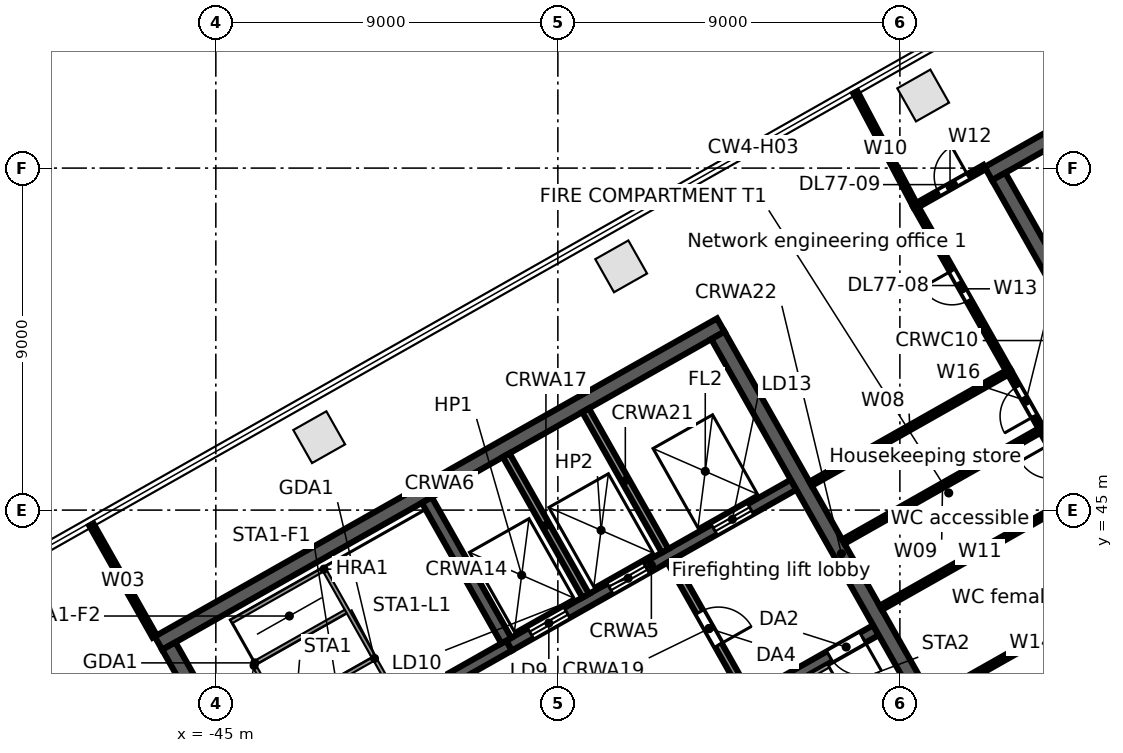
"""IFC4 building model, lengths in metres.
Left out: names, types, materials, properties, quantities, classifications, styles, units other than length and angle.
Written with IfcOpenShell. Run it as: python <this file> out.ifc"""

import sys

from ifc_helpers import new_model, si_unit, direction, frame, frame_2d, origin, origin_2d, place, context, subcontext, project, spatial, rectangle, extrude, element, fill, save


model = new_model("IFC4")
c1 = context("Model", 3, precision=1e-05, world=origin(), true_north=direction((0.0, 1.0)))
c2 = subcontext(c1, "Body", "Model", "MODEL_VIEW")
j1 = project(units=[si_unit("LENGTHUNIT", "METRE"), si_unit("PLANEANGLEUNIT", "RADIAN")], contexts=[c1])
p1 = place(None, origin())
s1 = spatial("IfcSite", under=j1, at=p1, CompositionType="ELEMENT")
p2 = place(p1, origin())
s2 = spatial("IfcBuilding", under=s1, at=p2, CompositionType="ELEMENT")
p3 = place(p2, frame((0.0, 0.0, 343.1)))
s3 = spatial("IfcBuildingStorey", under=s2, at=p3, CompositionType="ELEMENT", Elevation=343.1)
for number, where, z_axis, x_axis in (
    (1, (-26.388, 55.91, 0.0), (0.0, 0.0, 1.0), (-0.87, -0.492, 0.0)),
    (2, (-34.334, 51.414, 0.0), (0.0, 0.0, 1.0), (-0.87, -0.492, 0.0)),
):
    element("IfcColumn", number, at=place(p3, frame(where, z_axis=z_axis, x_axis=x_axis)), inside=s3, PredefinedType="COLUMN", context=c2, shape_type="SweptSolid", body=[
        extrude(rectangle(XDim=1.0, YDim=1.0, at=origin_2d()), origin(), (0.0, 0.0, 1.0), 3.5),
    ])
p4 = place(p3, frame((-42.28, 46.919, 0.0), z_axis=(0.0, 0.0, 1.0), x_axis=(-0.87035569594, -0.492423560103, 0.0)))
e3 = element("IfcColumn", 3, at=p4, inside=s3, PredefinedType="COLUMN", context=c2, shape_type="SweptSolid", body=[
    extrude(rectangle(XDim=1.0, YDim=1.0, at=origin_2d()), origin(), (0.0, 0.0, 1.0), 3.8),
])
p5 = place(p3, frame((-3.017, 46.293, 0.0), z_axis=(0.0, 0.0, 1.0), x_axis=(-0.870355474887, -0.492423950812, 0.0)))
e4 = element("IfcWall", 4, at=p5, inside=s3, PredefinedType="STANDARD", context=c2, shape_type="SweptSolid", body=[
    extrude(rectangle(XDim=40.34, YDim=0.25, at=frame_2d((20.17, 0.0))), origin(), (0.0, 0.0, 1.0), 3.5),
])
p6 = place(p5, frame((37.428, 0.0, 0.8)))
e5 = element("IfcOpeningElement", 5, at=p6, cuts=e4, PredefinedType="OPENING", context=c2, shape_type="SweptSolid", body=[
    extrude(rectangle(XDim=2.4, YDim=2.2, at=frame_2d((1.2, 1.1))), frame((0.0, 0.135, 0.0), z_axis=(0.0, -1.0, 0.0), x_axis=(1.0, 0.0, 0.0)), (0.0, 0.0, 1.0), 0.27),
])
p7 = place(p5, frame((34.372, 0.0, 0.0)))
e6 = element("IfcOpeningElement", 6, at=p7, cuts=e4, PredefinedType="OPENING", context=c2, shape_type="SweptSolid", body=[
    extrude(rectangle(XDim=1.8, YDim=2.4, at=frame_2d((0.9, 1.2))), frame((0.0, 0.135, 0.0), z_axis=(0.0, -1.0, 0.0), x_axis=(1.0, 0.0, 0.0)), (0.0, 0.0, 1.0), 0.27),
])
p8 = place(p5, frame((30.716, 0.0, 0.8)))
e7 = element("IfcOpeningElement", 7, at=p8, cuts=e4, PredefinedType="OPENING", context=c2, shape_type="SweptSolid", body=[
    extrude(rectangle(XDim=2.4, YDim=2.2, at=frame_2d((1.2, 1.1))), frame((0.0, 0.135, 0.0), z_axis=(0.0, -1.0, 0.0), x_axis=(1.0, 0.0, 0.0)), (0.0, 0.0, 1.0), 0.27),
])
p9 = place(p5, frame((27.36, 0.0, 0.8)))
e8 = element("IfcOpeningElement", 8, at=p9, cuts=e4, PredefinedType="OPENING", context=c2, shape_type="SweptSolid", body=[
    extrude(rectangle(XDim=2.4, YDim=2.2, at=frame_2d((1.2, 1.1))), frame((0.0, 0.135, 0.0), z_axis=(0.0, -1.0, 0.0), x_axis=(1.0, 0.0, 0.0)), (0.0, 0.0, 1.0), 0.27),
])
p10 = place(p5, frame((24.304, 0.0, 0.0)))
e9 = element("IfcOpeningElement", 9, at=p10, cuts=e4, PredefinedType="OPENING", context=c2, shape_type="SweptSolid", body=[
    extrude(rectangle(XDim=1.8, YDim=2.4, at=frame_2d((0.9, 1.2))), frame((0.0, 0.135, 0.0), z_axis=(0.0, -1.0, 0.0), x_axis=(1.0, 0.0, 0.0)), (0.0, 0.0, 1.0), 0.27),
])
p11 = place(p5, frame((20.648, 0.0, 0.8)))
e10 = element("IfcOpeningElement", 10, at=p11, cuts=e4, PredefinedType="OPENING", context=c2, shape_type="SweptSolid", body=[
    extrude(rectangle(XDim=2.4, YDim=2.2, at=frame_2d((1.2, 1.1))), frame((0.0, 0.135, 0.0), z_axis=(0.0, -1.0, 0.0), x_axis=(1.0, 0.0, 0.0)), (0.0, 0.0, 1.0), 0.27),
])
p12 = place(p5, frame((17.292, 0.0, 0.8)))
e11 = element("IfcOpeningElement", 11, at=p12, cuts=e4, PredefinedType="OPENING", context=c2, shape_type="SweptSolid", body=[
    extrude(rectangle(XDim=2.4, YDim=2.2, at=frame_2d((1.2, 1.1))), frame((0.0, 0.135, 0.0), z_axis=(0.0, -1.0, 0.0), x_axis=(1.0, 0.0, 0.0)), (0.0, 0.0, 1.0), 0.27),
])
p13 = place(p5, frame((14.236, 0.0, 0.0)))
e12 = element("IfcOpeningElement", 12, at=p13, cuts=e4, PredefinedType="OPENING", context=c2, shape_type="SweptSolid", body=[
    extrude(rectangle(XDim=1.8, YDim=2.4, at=frame_2d((0.9, 1.2))), frame((0.0, 0.135, 0.0), z_axis=(0.0, -1.0, 0.0), x_axis=(1.0, 0.0, 0.0)), (0.0, 0.0, 1.0), 0.27),
])
p14 = place(p5, frame((10.58, 0.0, 0.8)))
e13 = element("IfcOpeningElement", 13, at=p14, cuts=e4, PredefinedType="OPENING", context=c2, shape_type="SweptSolid", body=[
    extrude(rectangle(XDim=2.4, YDim=2.2, at=frame_2d((1.2, 1.1))), frame((0.0, 0.135, 0.0), z_axis=(0.0, -1.0, 0.0), x_axis=(1.0, 0.0, 0.0)), (0.0, 0.0, 1.0), 0.27),
])
p15 = place(p5, frame((7.224, 0.0, 0.8)))
e14 = element("IfcOpeningElement", 14, at=p15, cuts=e4, PredefinedType="OPENING", context=c2, shape_type="SweptSolid", body=[
    extrude(rectangle(XDim=2.4, YDim=2.2, at=frame_2d((1.2, 1.1))), frame((0.0, 0.135, 0.0), z_axis=(0.0, -1.0, 0.0), x_axis=(1.0, 0.0, 0.0)), (0.0, 0.0, 1.0), 0.27),
])
p16 = place(p5, frame((4.168, 0.0, 0.0)))
e15 = element("IfcOpeningElement", 15, at=p16, cuts=e4, PredefinedType="OPENING", context=c2, shape_type="SweptSolid", body=[
    extrude(rectangle(XDim=1.8, YDim=2.4, at=frame_2d((0.9, 1.2))), frame((0.0, 0.135, 0.0), z_axis=(0.0, -1.0, 0.0), x_axis=(1.0, 0.0, 0.0)), (0.0, 0.0, 1.0), 0.27),
])
p17 = place(p5, frame((0.512, 0.0, 0.8)))
e16 = element("IfcOpeningElement", 16, at=p17, cuts=e4, PredefinedType="OPENING", context=c2, shape_type="SweptSolid", body=[
    extrude(rectangle(XDim=2.4, YDim=2.2, at=frame_2d((1.2, 1.1))), frame((0.0, 0.135, 0.0), z_axis=(0.0, -1.0, 0.0), x_axis=(1.0, 0.0, 0.0)), (0.0, 0.0, 1.0), 0.27),
])
p18 = place(p3, frame((-34.245, 38.097, 0.0), z_axis=(0.0, 0.0, 1.0), x_axis=(0.870356351998, 0.492422400523, 0.0)))
e17 = element("IfcWall", 17, at=p18, inside=s3, PredefinedType="SOLIDWALL", context=c2, shape_type="SweptSolid", body=[
    extrude(rectangle(XDim=7.6, YDim=0.3, at=frame_2d((3.8, 0.0))), origin(), (0.0, 0.0, 1.0), 3.5),
])
p19 = place(p18, frame((6.2, 0.0, 0.0)))
e18 = element("IfcOpeningElement", 18, at=p19, cuts=e17, PredefinedType="OPENING", context=c2, shape_type="SweptSolid", body=[
    extrude(rectangle(XDim=1.0, YDim=2.1, at=frame_2d((0.5, 1.05))), frame((0.0, 0.16, 0.0), z_axis=(0.0, -1.0, 0.0), x_axis=(1.0, 0.0, 0.0)), (0.0, 0.0, 1.0), 0.32),
])
p20 = place(p3, frame((-43.897, 37.692, 0.0), z_axis=(0.0, 0.0, 1.0), x_axis=(0.870356351998, 0.492422400523, 0.0)))
e19 = element("IfcWall", 19, at=p20, inside=s3, PredefinedType="SOLIDWALL", context=c2, shape_type="SweptSolid", body=[
    extrude(rectangle(XDim=7.6, YDim=0.3, at=frame_2d((3.8, 0.0))), origin(), (0.0, 0.0, 1.0), 3.5),
])
p21 = place(p20, frame((0.4, 0.0, 0.0)))
e20 = element("IfcOpeningElement", 20, at=p21, cuts=e19, PredefinedType="OPENING", context=c2, shape_type="SweptSolid", body=[
    extrude(rectangle(XDim=1.0, YDim=2.1, at=frame_2d((0.5, 1.05))), frame((0.0, 0.16, 0.0), z_axis=(0.0, -1.0, 0.0), x_axis=(1.0, 0.0, 0.0)), (0.0, 0.0, 1.0), 0.32),
])
p22 = place(p3, frame((-37.282, 41.435, 0.0), z_axis=(0.0, 0.0, 1.0), x_axis=(0.870361315115, 0.492413628113, 0.0)))
e21 = element("IfcWall", 21, at=p22, inside=s3, PredefinedType="SOLIDWALL", context=c2, shape_type="SweptSolid", body=[
    extrude(rectangle(XDim=8.6, YDim=0.3, at=frame_2d((4.3, 0.0))), origin(), (0.0, 0.0, 1.0), 3.5),
])
p23 = place(p22, frame((0.65, 0.0, 0.0)))
e22 = element("IfcOpeningElement", 22, at=p23, cuts=e21, PredefinedType="OPENING", context=c2, shape_type="SweptSolid", body=[
    extrude(rectangle(XDim=1.1, YDim=2.1, at=frame_2d((0.55, 1.05))), frame((0.0, 0.16, 0.0), z_axis=(0.0, -1.0, 0.0), x_axis=(1.0, 0.0, 0.0)), (0.0, 0.0, 1.0), 0.32),
])
p24 = place(p22, frame((3.05, 0.0, 0.0)))
e23 = element("IfcOpeningElement", 23, at=p24, cuts=e21, PredefinedType="OPENING", context=c2, shape_type="SweptSolid", body=[
    extrude(rectangle(XDim=1.1, YDim=2.1, at=frame_2d((0.55, 1.05))), frame((0.0, 0.16, 0.0), z_axis=(0.0, -1.0, 0.0), x_axis=(1.0, 0.0, 0.0)), (0.0, 0.0, 1.0), 0.32),
])
p25 = place(p22, frame((6.2, 0.0, 0.0)))
e24 = element("IfcOpeningElement", 24, at=p25, cuts=e21, PredefinedType="OPENING", context=c2, shape_type="SweptSolid", body=[
    extrude(rectangle(XDim=1.1, YDim=2.1, at=frame_2d((0.55, 1.05))), frame((0.0, 0.16, 0.0), z_axis=(0.0, -1.0, 0.0), x_axis=(1.0, 0.0, 0.0)), (0.0, 0.0, 1.0), 0.32),
])
p26 = place(p3, frame((-46.51, 41.499, 0.0), z_axis=(0.0, 0.0, 1.0), x_axis=(0.870356271124, 0.492422543467, 0.0)))
e25 = element("IfcWall", 25, at=p26, inside=s3, PredefinedType="SOLIDWALL", context=c2, shape_type="SweptSolid", body=[
    extrude(rectangle(XDim=17.0, YDim=0.4, at=frame_2d((8.5, 0.0))), origin(), (0.0, 0.0, 1.0), 3.5),
])
p27 = place(p3, frame((-46.238, 41.423, 0.0), z_axis=(0.0, 0.0, 1.0), x_axis=(0.492421663121, -0.870356769198, 0.0)))
e26 = element("IfcWall", 26, at=p27, inside=s3, PredefinedType="SOLIDWALL", context=c2, shape_type="SweptSolid", body=[
    extrude(rectangle(XDim=13.2, YDim=0.4, at=frame_2d((6.6, 0.0))), origin(), (0.0, 0.0, 1.0), 3.5),
])
p28 = place(p3, frame((-39.449, 45.264, 0.0), z_axis=(0.0, 0.0, 1.0), x_axis=(0.492422543467, -0.870356271124, 0.0)))
e27 = element("IfcWall", 27, at=p28, inside=s3, PredefinedType="SOLIDWALL", context=c2, shape_type="SweptSolid", body=[
    extrude(rectangle(XDim=4.25, YDim=0.3, at=frame_2d((2.125, 0.0))), origin(), (0.0, 0.0, 1.0), 3.5),
])
p29 = place(p3, frame((-37.36, 46.446, 0.0), z_axis=(0.0, 0.0, 1.0), x_axis=(0.492422543467, -0.870356271124, 0.0)))
e28 = element("IfcWall", 28, at=p29, inside=s3, PredefinedType="SOLIDWALL", context=c2, shape_type="SweptSolid", body=[
    extrude(rectangle(XDim=4.25, YDim=0.2, at=frame_2d((2.125, 0.0))), origin(), (0.0, 0.0, 1.0), 3.5),
])
p30 = place(p3, frame((-33.031, 43.667, 0.0), z_axis=(0.0, 0.0, 1.0), x_axis=(0.492408451753, -0.87036424366, 0.0)))
e29 = element("IfcWall", 29, at=p30, inside=s3, PredefinedType="PARTITIONING", context=c2, shape_type="SweptSolid", body=[
    extrude(rectangle(XDim=4.1, YDim=0.2, at=frame_2d((2.05, 0.0))), origin(), (0.0, 0.0, 1.0), 3.5),
])
p31 = place(p30, frame((1.55, 0.0, 0.0)))
e30 = element("IfcOpeningElement", 30, at=p31, cuts=e29, PredefinedType="OPENING", context=c2, shape_type="SweptSolid", body=[
    extrude(rectangle(XDim=1.0, YDim=2.1, at=frame_2d((0.5, 1.05))), frame((0.0, 0.11, 0.0), z_axis=(0.0, -1.0, 0.0), x_axis=(1.0, 0.0, 0.0)), (0.0, 0.0, 1.0), 0.22),
])
p32 = place(p3, frame((-35.271, 47.628, 0.0), z_axis=(0.0, 0.0, 1.0), x_axis=(0.492422543467, -0.870356271124, 0.0)))
e31 = element("IfcWall", 31, at=p32, inside=s3, PredefinedType="SOLIDWALL", context=c2, shape_type="SweptSolid", body=[
    extrude(rectangle(XDim=4.25, YDim=0.2, at=frame_2d((2.125, 0.0))), origin(), (0.0, 0.0, 1.0), 3.5),
])
p33 = place(p3, frame((-31.79, 49.597, 0.0), z_axis=(0.0, 0.0, 1.0), x_axis=(0.492421663121, -0.870356769198, 0.0)))
e32 = element("IfcWall", 32, at=p33, inside=s3, PredefinedType="SOLIDWALL", context=c2, shape_type="SweptSolid", body=[
    extrude(rectangle(XDim=13.2, YDim=0.4, at=frame_2d((6.6, 0.0))), origin(), (0.0, 0.0, 1.0), 3.5),
])
p34 = place(p3, frame((-24.672, 53.854, 0.0), z_axis=(0.0, 0.0, 1.0), x_axis=(0.870353598469, 0.492427267353, 0.0)))
e33 = element("IfcWall", 33, at=p34, inside=s3, PredefinedType="SOLIDWALL", context=c2, shape_type="SweptSolid", body=[
    extrude(rectangle(XDim=15.0, YDim=0.4, at=frame_2d((7.5, 0.0))), origin(), (0.0, 0.0, 1.0), 3.5),
])
p35 = place(p3, frame((-24.4, 53.779, 0.0), z_axis=(0.0, 0.0, 1.0), x_axis=(0.492421663121, -0.870356769198, 0.0)))
e34 = element("IfcWall", 34, at=p35, inside=s3, PredefinedType="SOLIDWALL", context=c2, shape_type="SweptSolid", body=[
    extrude(rectangle(XDim=13.2, YDim=0.4, at=frame_2d((6.6, 0.0))), origin(), (0.0, 0.0, 1.0), 3.5),
])
p36 = place(p3, frame((-48.275, 44.618, 0.0), z_axis=(0.0, 0.0, 1.0), x_axis=(0.492404360331, -0.870366558369, 0.0)))
e35 = element("IfcWall", 35, at=p36, inside=s3, PredefinedType="PARTITIONING", context=c2, shape_type="SweptSolid", body=[
    extrude(rectangle(XDim=3.384, YDim=0.125, at=frame_2d((1.692, 0.0))), origin(), (0.0, 0.0, 1.0), 2.88),
])
p37 = place(p3, frame((-29.35, 45.692, 0.0), z_axis=(0.0, 0.0, 1.0), x_axis=(0.870318719588, 0.492488909859, 0.0)))
e36 = element("IfcWall", 36, at=p37, inside=s3, PredefinedType="PARTITIONING", context=c2, shape_type="SweptSolid", body=[
    extrude(rectangle(XDim=6.0, YDim=0.125, at=frame_2d((3.0, 0.0))), origin(), (0.0, 0.0, 1.0), 3.5),
])
p38 = place(p3, frame((-28.489, 44.169, 0.0), z_axis=(0.0, 0.0, 1.0), x_axis=(0.870308850352, 0.492506350211, 0.0)))
e37 = element("IfcWall", 37, at=p38, inside=s3, PredefinedType="PARTITIONING", context=c2, shape_type="SweptSolid", body=[
    extrude(rectangle(XDim=6.0, YDim=0.125, at=frame_2d((3.0, 0.0))), origin(), (0.0, 0.0, 1.0), 2.88),
])
p39 = place(p3, frame((-28.171, 55.993, 0.0), z_axis=(0.0, 0.0, 1.0), x_axis=(0.466919980712, -0.884299571193, 0.0)))
e38 = element("IfcWall", 38, at=p39, inside=s3, PredefinedType="PARTITIONING", context=c2, shape_type="SweptSolid", body=[
    extrude(rectangle(XDim=3.385, YDim=0.125, at=frame_2d((1.693, 0.0))), origin(), (0.0, 0.0, 1.0), 2.38),
])
p40 = place(p3, frame((-27.504, 42.428, 0.0), z_axis=(0.0, 0.0, 1.0), x_axis=(0.870308850352, 0.492506350211, 0.0)))
e39 = element("IfcWall", 39, at=p40, inside=s3, PredefinedType="PARTITIONING", context=c2, shape_type="SweptSolid", body=[
    extrude(rectangle(XDim=6.0, YDim=0.125, at=frame_2d((3.0, 0.0))), origin(), (0.0, 0.0, 1.0), 2.88),
])
p41 = place(p3, frame((-26.59, 52.999, 0.0), z_axis=(0.0, 0.0, 1.0), x_axis=(0.870384380082, 0.492372857609, 0.0)))
e40 = element("IfcWall", 40, at=p41, inside=s3, PredefinedType="PARTITIONING", context=c2, shape_type="SweptSolid", body=[
    extrude(rectangle(XDim=2.09, YDim=0.125, at=frame_2d((1.045, 0.0))), origin(), (0.0, 0.0, 1.0), 2.88),
])
p42 = place(p41, frame((0.7, 0.0, 0.0)))
e41 = element("IfcOpeningElement", 41, at=p42, cuts=e40, PredefinedType="OPENING", context=c2, shape_type="SweptSolid", body=[
    extrude(rectangle(XDim=0.9, YDim=2.1, at=frame_2d((0.45, 1.05))), frame((0.0, 0.073, 0.0), z_axis=(0.0, -1.0, 0.0), x_axis=(1.0, 0.0, 0.0)), (0.0, 0.0, 1.0), 0.145),
])
p43 = place(p3, frame((-26.59, 52.999, 0.0), z_axis=(0.0, 0.0, 1.0), x_axis=(0.492406341242, -0.870365437678, 0.0)))
e42 = element("IfcWall", 42, at=p43, inside=s3, PredefinedType="PARTITIONING", context=c2, shape_type="SweptSolid", body=[
    extrude(rectangle(XDim=5.0, YDim=0.125, at=frame_2d((2.5, 0.0))), origin(), (0.0, 0.0, 1.0), 3.5),
])
p44 = place(p43, frame((1.95, 0.0, 0.0)))
e43 = element("IfcOpeningElement", 43, at=p44, cuts=e42, PredefinedType="OPENING", context=c2, shape_type="SweptSolid", body=[
    extrude(rectangle(XDim=0.9, YDim=2.1, at=frame_2d((0.45, 1.05))), frame((0.0, 0.073, 0.0), z_axis=(0.0, -1.0, 0.0), x_axis=(1.0, 0.0, 0.0)), (0.0, 0.0, 1.0), 0.145),
])
p45 = place(p3, frame((-26.15, 40.035, 0.0), z_axis=(0.0, 0.0, 1.0), x_axis=(0.870418064747, 0.492313307317, 0.0)))
e44 = element("IfcWall", 44, at=p45, inside=s3, PredefinedType="PARTITIONING", context=c2, shape_type="SweptSolid", body=[
    extrude(rectangle(XDim=6.0, YDim=0.125, at=frame_2d((3.0, 0.0))), origin(), (0.0, 0.0, 1.0), 2.88),
])
p46 = place(p3, frame((-24.919, 37.859, 0.0), z_axis=(0.0, 0.0, 1.0), x_axis=(0.870308850352, 0.492506350211, 0.0)))
e45 = element("IfcWall", 45, at=p46, inside=s3, PredefinedType="PARTITIONING", context=c2, shape_type="SweptSolid", body=[
    extrude(rectangle(XDim=6.0, YDim=0.15, at=frame_2d((3.0, 0.0))), origin(), (0.0, 0.0, 1.0), 2.88),
])
p47 = place(p46, frame((2.45, 0.0, 0.0)))
e46 = element("IfcOpeningElement", 46, at=p47, cuts=e45, PredefinedType="OPENING", context=c2, shape_type="SweptSolid", body=[
    extrude(rectangle(XDim=0.9, YDim=2.1, at=frame_2d((0.45, 1.05))), frame((0.0, 0.085, 0.0), z_axis=(0.0, -1.0, 0.0), x_axis=(1.0, 0.0, 0.0)), (0.0, 0.0, 1.0), 0.17),
])
p48 = place(p3, frame((-24.128, 48.647, 0.0), z_axis=(0.0, 0.0, 1.0), x_axis=(0.492075650803, -0.870552441778, 0.0)))
e47 = element("IfcWall", 47, at=p48, inside=s3, PredefinedType="PARTITIONING", context=c2, shape_type="SweptSolid", body=[
    extrude(rectangle(XDim=1.75, YDim=0.125, at=frame_2d((0.875, 0.0))), origin(), (0.0, 0.0, 1.0), 3.5),
])
p49 = place(p48, frame((0.45, 0.0, 0.0)))
e48 = element("IfcOpeningElement", 48, at=p49, cuts=e47, PredefinedType="OPENING", context=c2, shape_type="SweptSolid", body=[
    extrude(rectangle(XDim=0.9, YDim=2.1, at=frame_2d((0.45, 1.05))), frame((0.0, 0.073, 0.0), z_axis=(0.0, -1.0, 0.0), x_axis=(1.0, 0.0, 0.0)), (0.0, 0.0, 1.0), 0.145),
])
p50 = place(p3, frame((-23.267, 47.124, 0.0), z_axis=(0.0, 0.0, 1.0), x_axis=(0.492467412326, -0.870330884088, 0.0)))
e49 = element("IfcWall", 49, at=p50, inside=s3, PredefinedType="PARTITIONING", context=c2, shape_type="SweptSolid", body=[
    extrude(rectangle(XDim=2.0, YDim=0.15, at=frame_2d((1.0, 0.0))), origin(), (0.0, 0.0, 1.0), 2.88),
])
p51 = place(p50, frame((0.45, 0.0, 0.0)))
e50 = element("IfcOpeningElement", 50, at=p51, cuts=e49, PredefinedType="OPENING", context=c2, shape_type="SweptSolid", body=[
    extrude(rectangle(XDim=0.9, YDim=2.1, at=frame_2d((0.45, 1.05))), frame((0.0, 0.085, 0.0), z_axis=(0.0, -1.0, 0.0), x_axis=(1.0, 0.0, 0.0)), (0.0, 0.0, 1.0), 0.17),
])
p52 = place(p23, origin())
e51 = element("IfcDoor", 51, at=p52, inside=s3, OperationType="DOUBLE_DOOR_SLIDING", PredefinedType="DOOR", context=c2, shape_type="SweptSolid", body=[
    extrude(rectangle(XDim=1.1, YDim=2.1, at=frame_2d((0.55, 1.05))), frame((0.0, 0.025, 0.0), z_axis=(0.0, -1.0, 0.0), x_axis=(1.0, 0.0, 0.0)), (0.0, 0.0, 1.0), 0.05),
])
fill(e22, e51)
p53 = place(p24, origin())
e52 = element("IfcDoor", 52, at=p53, inside=s3, OperationType="DOUBLE_DOOR_SLIDING", PredefinedType="DOOR", context=c2, shape_type="SweptSolid", body=[
    extrude(rectangle(XDim=1.1, YDim=2.1, at=frame_2d((0.55, 1.05))), frame((0.0, 0.025, 0.0), z_axis=(0.0, -1.0, 0.0), x_axis=(1.0, 0.0, 0.0)), (0.0, 0.0, 1.0), 0.05),
])
fill(e23, e52)
p54 = place(p25, origin())
e53 = element("IfcDoor", 53, at=p54, inside=s3, OperationType="DOUBLE_DOOR_SLIDING", PredefinedType="DOOR", context=c2, shape_type="SweptSolid", body=[
    extrude(rectangle(XDim=1.1, YDim=2.1, at=frame_2d((0.55, 1.05))), frame((0.0, 0.025, 0.0), z_axis=(0.0, -1.0, 0.0), x_axis=(1.0, 0.0, 0.0)), (0.0, 0.0, 1.0), 0.05),
])
fill(e24, e53)
p55 = place(p19, frame((1.0, 0.0, 0.0), z_axis=(0.0, 0.0, 1.0), x_axis=(-1.0, 0.0, 0.0)))
e54 = element("IfcDoor", 54, at=p55, inside=s3, OperationType="SINGLE_SWING_LEFT", PredefinedType="DOOR", context=c2, shape_type="SweptSolid", body=[
    extrude(rectangle(XDim=1.0, YDim=2.1, at=frame_2d((0.5, 1.05))), frame((0.0, 0.025, 0.0), z_axis=(0.0, -1.0, 0.0), x_axis=(1.0, 0.0, 0.0)), (0.0, 0.0, 1.0), 0.05),
])
fill(e18, e54)
p56 = place(p31, origin())
e55 = element("IfcDoor", 55, at=p56, inside=s3, OperationType="SINGLE_SWING_RIGHT", PredefinedType="DOOR", context=c2, shape_type="SweptSolid", body=[
    extrude(rectangle(XDim=1.0, YDim=2.1, at=frame_2d((0.5, 1.05))), frame((0.0, 0.025, 0.0), z_axis=(0.0, -1.0, 0.0), x_axis=(1.0, 0.0, 0.0)), (0.0, 0.0, 1.0), 0.05),
])
fill(e30, e55)
p57 = place(p49, frame((0.9, 0.0, 0.0), z_axis=(0.0, 0.0, 1.0), x_axis=(-1.0, 0.0, 0.0)))
e56 = element("IfcDoor", 56, at=p57, inside=s3, OperationType="SINGLE_SWING_LEFT", PredefinedType="DOOR", context=c2, shape_type="SweptSolid", body=[
    extrude(rectangle(XDim=0.9, YDim=2.1, at=frame_2d((0.45, 1.05))), frame((0.0, 0.025, 0.0), z_axis=(0.0, -1.0, 0.0), x_axis=(1.0, 0.0, 0.0)), (0.0, 0.0, 1.0), 0.05),
])
fill(e48, e56)
p58 = place(p44, frame((0.9, 0.0, 0.0), z_axis=(0.0, 0.0, 1.0), x_axis=(-1.0, 0.0, 0.0)))
e57 = element("IfcDoor", 57, at=p58, inside=s3, OperationType="SINGLE_SWING_RIGHT", PredefinedType="DOOR", context=c2, shape_type="SweptSolid", body=[
    extrude(rectangle(XDim=0.9, YDim=2.1, at=frame_2d((0.45, 1.05))), frame((0.0, 0.025, 0.0), z_axis=(0.0, -1.0, 0.0), x_axis=(1.0, 0.0, 0.0)), (0.0, 0.0, 1.0), 0.05),
])
fill(e43, e57)
p59 = place(p42, origin())
e58 = element("IfcDoor", 58, at=p59, inside=s3, OperationType="SINGLE_SWING_RIGHT", PredefinedType="DOOR", context=c2, shape_type="SweptSolid", body=[
    extrude(rectangle(XDim=0.9, YDim=2.1, at=frame_2d((0.45, 1.05))), frame((0.0, 0.025, 0.0), z_axis=(0.0, -1.0, 0.0), x_axis=(1.0, 0.0, 0.0)), (0.0, 0.0, 1.0), 0.05),
])
fill(e41, e58)
save(model, sys.argv[1])
